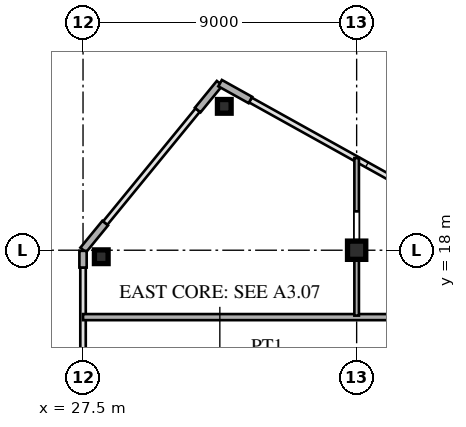
"""IFC4 building model, lengths in metres.
Left out: names, types, materials, properties, quantities, classifications, styles, units other than length and angle.
Written with IfcOpenShell. Run it as: python <this file> out.ifc"""

import sys

from ifc_helpers import new_model, si_unit, direction, frame, frame_2d, origin, origin_2d, place, context, subcontext, project, spatial, rectangle, hollow_rectangle, i_section, extrude, source, transform, mapped, element, save


model = new_model("IFC4")
c1 = context("Model", 3, precision=1e-05, world=origin(), true_north=direction((0.0, 1.0)))
c2 = subcontext(c1, "Body", "Model", "MODEL_VIEW")
j1 = project(units=[si_unit("LENGTHUNIT", "METRE"), si_unit("PLANEANGLEUNIT", "RADIAN")], contexts=[c1])
p1 = place(None, origin())
s1 = spatial("IfcSite", under=j1, at=p1, CompositionType="ELEMENT")
p2 = place(p1, origin())
s2 = spatial("IfcBuilding", under=s1, at=p2, CompositionType="ELEMENT")
p3 = place(p2, frame((0.0, 0.0, 158.4)))
s3 = spatial("IfcBuildingStorey", under=s2, at=p3, CompositionType="ELEMENT", Elevation=158.4)
m1 = source(origin(), c2, "Body", "SweptSolid", [
    extrude(i_section(OverallWidth=0.6, OverallDepth=0.6, WebThickness=0.025, FlangeThickness=0.04, at=origin_2d()), origin(), (0.0, 0.0, 1.0), 3.6),
])
p4 = place(p3, frame((36.5, 18.0, 0.0), z_axis=(0.0, 0.0, 1.0), x_axis=(1.0, 0.0, 0.0)))
e1 = element("IfcColumn", 1, at=p4, inside=s3, PredefinedType="COLUMN", context=c2, shape_type="MappedRepresentation", body=[
    mapped(m1, transform((0.0, 0.0, 0.0), scale=1.0)),
])
m2 = source(origin(), c2, "Body", "SweptSolid", [
    extrude(hollow_rectangle(XDim=0.45, YDim=0.45, WallThickness=0.018, at=origin_2d()), origin(), (0.0, 0.0, 1.0), 3.6),
])
for number, where, z_axis, x_axis in (
    (2, (32.147, 22.732, 0.0), (0.0, 0.0, 1.0), (1.0, 0.0, 0.0)),
    (3, (28.1, 17.786, 0.0), (0.0, 0.0, 1.0), (1.0, 0.0, 0.0)),
):
    element("IfcColumn", number, at=place(p3, frame(where, z_axis=z_axis, x_axis=x_axis)), inside=s3, PredefinedType="COLUMN", context=c2, shape_type="MappedRepresentation", body=[
        mapped(m2, transform((0.0, 0.0, 0.0), scale=1.0)),
    ])
p5 = place(p3, frame((33.005, 22.941, 0.0), z_axis=(0.0, 0.0, 1.0), x_axis=(-0.87385402111, 0.486188389196, 0.0)))
e4 = element("IfcWall", 4, at=p5, inside=s3, PredefinedType="SOLIDWALL", context=c2, shape_type="SweptSolid", body=[
    extrude(rectangle(XDim=1.14, YDim=0.24, at=frame_2d((0.57, 0.0))), origin(), (0.0, 0.0, 1.0), 3.34),
])
for number, where, z_axis, x_axis in (
    (5, (31.994, 23.492, 0.0), (0.0, 0.0, 1.0), (-0.633, -0.774, 0.0)),
    (6, (28.228, 18.89, 0.0), (0.0, 0.0, 1.0), (-0.633, -0.774, 0.0)),
):
    element("IfcWall", number, at=place(p3, frame(where, z_axis=z_axis, x_axis=x_axis)), inside=s3, PredefinedType="SOLIDWALL", context=c2, shape_type="SweptSolid", body=[
        extrude(rectangle(XDim=1.14, YDim=0.24, at=frame_2d((0.57, 0.0))), origin(), (0.0, 0.0, 1.0), 3.34),
    ])
p6 = place(p3, frame((27.5, 17.43, 0.0), z_axis=(0.0, 0.0, 1.0), x_axis=(0.0, 1.0, 0.0)))
e7 = element("IfcWall", 7, at=p6, inside=s3, PredefinedType="SOLIDWALL", context=c2, shape_type="SweptSolid", body=[
    extrude(rectangle(XDim=0.55, YDim=0.24, at=frame_2d((0.275, 0.0))), origin(), (0.0, 0.0, 1.0), 3.34),
])
p7 = place(p3, frame((27.5, 15.8, 0.0), z_axis=(0.0, 0.0, 1.0), x_axis=(1.0, 0.0, 0.0)))
e8 = element("IfcWall", 8, at=p7, inside=s3, PredefinedType="PARTITIONING", context=c2, shape_type="SweptSolid", body=[
    extrude(rectangle(XDim=12.115, YDim=0.2, at=frame_2d((6.058, 0.0))), origin(), (0.0, 0.0, 1.0), 3.34),
])
p8 = place(p3, frame((36.5, 15.85, 0.0), z_axis=(0.0, 0.0, 1.0), x_axis=(0.0, 1.0, 0.0)))
e9 = element("IfcWall", 9, at=p8, inside=s3, PredefinedType="PARTITIONING", context=c2, shape_type="SweptSolid", body=[
    extrude(rectangle(XDim=2.17, YDim=0.15, at=frame_2d((1.085, 0.0))), origin(), (0.0, 0.0, 1.0), 2.44),
])
p9 = place(p3, frame((36.5, 18.02, 0.0), z_axis=(0.0, 0.0, 1.0), x_axis=(0.0, 1.0, 0.0)))
e10 = element("IfcWall", 10, at=p9, inside=s3, PredefinedType="PARTITIONING", context=c2, shape_type="SweptSolid", body=[
    extrude(rectangle(XDim=3.012, YDim=0.15, at=frame_2d((1.506, 0.0))), origin(), (0.0, 0.0, 1.0), 3.34),
])
p10 = place(p9, frame((0.308, 0.0, 0.0)))
e11 = element("IfcOpeningElement", 11, at=p10, cuts=e10, PredefinedType="OPENING", context=c2, shape_type="SweptSolid", body=[
    extrude(rectangle(XDim=0.95, YDim=2.15, at=frame_2d((0.475, 1.075))), frame((0.0, 0.085, 0.0), z_axis=(0.0, -1.0, 0.0), x_axis=(1.0, 0.0, 0.0)), (0.0, 0.0, 1.0), 0.17),
])
save(model, sys.argv[1])
